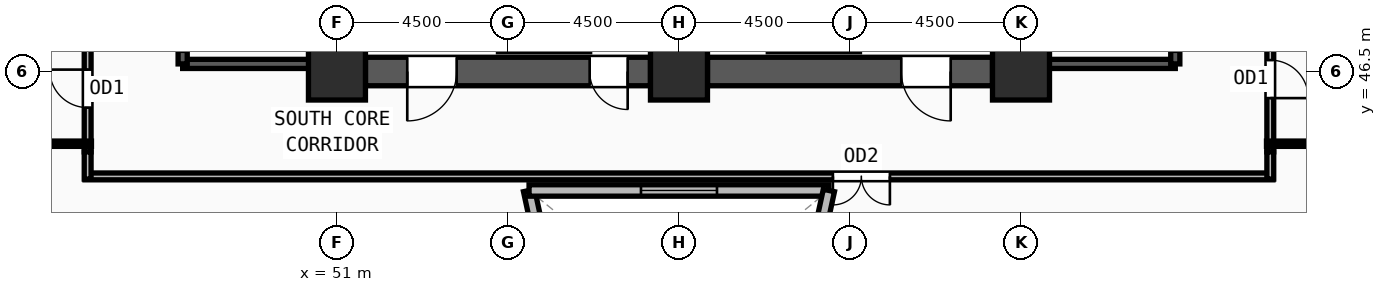
"""IFC4 building model, lengths in metres.
Left out: names, types, materials, properties, quantities, classifications, styles, units other than length and angle.
Written with IfcOpenShell. Run it as: python <this file> out.ifc"""

import sys

from ifc_helpers import new_model, si_unit, direction, frame, frame_2d, origin, origin_2d, place, context, subcontext, project, spatial, rectangle, extrude, source, transform, mapped, element, fill, save


model = new_model("IFC4")
c1 = context("Model", 3, precision=1e-05, world=origin(), true_north=direction((0.0, 1.0)))
c2 = subcontext(c1, "Body", "Model", "MODEL_VIEW")
j1 = project(units=[si_unit("LENGTHUNIT", "METRE"), si_unit("PLANEANGLEUNIT", "RADIAN")], contexts=[c1])
p1 = place(None, origin())
s1 = spatial("IfcSite", under=j1, at=p1, CompositionType="ELEMENT")
p2 = place(p1, origin())
s2 = spatial("IfcBuilding", under=s1, at=p2, CompositionType="ELEMENT")
p3 = place(p2, frame((0.0, 0.0, 166.5)))
s3 = spatial("IfcBuildingStorey", under=s2, at=p3, CompositionType="ELEMENT", Elevation=166.5)
m1 = source(origin(), c2, "Body", "SweptSolid", [
    extrude(rectangle(XDim=1.5, YDim=1.5, at=origin_2d()), origin(), (0.0, 0.0, 1.0), 3.75),
])
for number, where, z_axis, x_axis in (
    (1, (51.0, 46.5, 0.0), (0.0, 0.0, 1.0), (1.0, 0.0, 0.0)),
    (2, (60.0, 46.5, 0.0), (0.0, 0.0, 1.0), (1.0, 0.0, 0.0)),
    (3, (69.0, 46.5, 0.0), (0.0, 0.0, 1.0), (1.0, 0.0, 0.0)),
):
    element("IfcColumn", number, at=place(p3, frame(where, z_axis=z_axis, x_axis=x_axis)), inside=s3, PredefinedType="COLUMN", context=c2, shape_type="MappedRepresentation", body=[
        mapped(m1, transform((0.0, 0.0, 0.0), x_axis=(1.0, 0.0, 0.0), y_axis=(0.0, 1.0, 0.0), z_axis=(0.0, 0.0, 1.0), scale=1.0)),
    ])
p4 = place(p3, frame((66.073, 17.699, 0.0), z_axis=(0.0, 0.0, 1.0), x_axis=(0.551232339882, 0.834351788796, 0.0)))
e4 = element("IfcWall", 4, at=p4, inside=s3, PredefinedType="SOLIDWALL", context=c2, shape_type="SweptSolid", body=[
    extrude(rectangle(XDim=30.439, YDim=0.42, at=frame_2d((15.22, 0.0))), origin(), (0.0, 0.0, 1.0), 3.57),
])
m2 = source(origin(), c2, "Body", "SweptSolid", [
    extrude(rectangle(XDim=1.65, YDim=1.95, at=frame_2d((0.825, 0.975))), frame((0.0, 0.22, 0.0), z_axis=(0.0, -1.0, 0.0), x_axis=(1.0, 0.0, 0.0)), (0.0, 0.0, 1.0), 0.44),
])
p5 = place(p4, frame((6.785, 0.0, 0.55)))
e5 = element("IfcOpeningElement", 5, at=p5, cuts=e4, PredefinedType="OPENING", context=c2, shape_type="MappedRepresentation", body=[
    mapped(m2, transform((0.0, 0.0, 0.0), x_axis=(1.0, 0.0, 0.0), y_axis=(0.0, 1.0, 0.0), z_axis=(0.0, 0.0, 1.0), scale=1.0)),
])
p6 = place(p4, frame((14.395, 0.0, 0.55)))
e6 = element("IfcOpeningElement", 6, at=p6, cuts=e4, PredefinedType="OPENING", context=c2, shape_type="MappedRepresentation", body=[
    mapped(m2, transform((0.0, 0.0, 0.0), x_axis=(1.0, 0.0, 0.0), y_axis=(0.0, 1.0, 0.0), z_axis=(0.0, 0.0, 1.0), scale=1.0)),
])
p7 = place(p4, frame((22.004, 0.0, 0.55)))
e7 = element("IfcOpeningElement", 7, at=p7, cuts=e4, PredefinedType="OPENING", context=c2, shape_type="MappedRepresentation", body=[
    mapped(m2, transform((0.0, 0.0, 0.0), x_axis=(1.0, 0.0, 0.0), y_axis=(0.0, 1.0, 0.0), z_axis=(0.0, 0.0, 1.0), scale=1.0)),
])
p8 = place(p3, frame((68.25, 46.5, 0.0), z_axis=(0.0, 0.0, 1.0), x_axis=(-1.0, 0.0, 0.0)))
e8 = element("IfcWall", 8, at=p8, inside=s3, PredefinedType="SHEAR", context=c2, shape_type="SweptSolid", body=[
    extrude(rectangle(XDim=7.5, YDim=0.75, at=frame_2d((3.75, 0.0))), origin(), (0.0, 0.0, 1.0), 3.57),
])
m3 = source(origin(), c2, "Body", "SweptSolid", [
    extrude(rectangle(XDim=1.3, YDim=2.2, at=frame_2d((0.65, 1.1))), frame((0.0, 0.385, 0.0), z_axis=(0.0, -1.0, 0.0), x_axis=(1.0, 0.0, 0.0)), (0.0, 0.0, 1.0), 0.77),
])
p9 = place(p8, frame((1.1, 0.0, 0.0)))
e9 = element("IfcOpeningElement", 9, at=p9, cuts=e8, PredefinedType="OPENING", context=c2, shape_type="MappedRepresentation", body=[
    mapped(m3, transform((0.0, 0.0, 0.0), x_axis=(1.0, 0.0, 0.0), y_axis=(0.0, 1.0, 0.0), z_axis=(0.0, 0.0, 1.0), scale=1.0)),
])
p10 = place(p3, frame((59.25, 46.5, 0.0), z_axis=(0.0, 0.0, 1.0), x_axis=(-1.0, 0.0, 0.0)))
e10 = element("IfcWall", 10, at=p10, inside=s3, PredefinedType="SHEAR", context=c2, shape_type="SweptSolid", body=[
    extrude(rectangle(XDim=7.5, YDim=0.75, at=frame_2d((3.75, 0.0))), origin(), (0.0, 0.0, 1.0), 3.57),
])
p11 = place(p10, frame((5.1, 0.0, 0.0)))
e11 = element("IfcOpeningElement", 11, at=p11, cuts=e10, PredefinedType="OPENING", context=c2, shape_type="MappedRepresentation", body=[
    mapped(m3, transform((0.0, 0.0, 0.0), x_axis=(1.0, 0.0, 0.0), y_axis=(0.0, 1.0, 0.0), z_axis=(0.0, 0.0, 1.0), scale=1.0)),
])
m4 = source(origin(), c2, "Body", "SweptSolid", [
    extrude(rectangle(XDim=1.0, YDim=2.2, at=frame_2d((0.5, 1.1))), frame((0.0, 0.385, 0.0), z_axis=(0.0, -1.0, 0.0), x_axis=(1.0, 0.0, 0.0)), (0.0, 0.0, 1.0), 0.77),
])
p12 = place(p10, frame((0.6, 0.0, 0.0)))
e12 = element("IfcOpeningElement", 12, at=p12, cuts=e10, PredefinedType="OPENING", context=c2, shape_type="MappedRepresentation", body=[
    mapped(m4, transform((0.0, 0.0, 0.0), x_axis=(1.0, 0.0, 0.0), y_axis=(0.0, 1.0, 0.0), z_axis=(0.0, 0.0, 1.0), scale=1.0)),
])
p13 = place(p3, frame((46.94, 46.7, 0.0), z_axis=(0.0, 0.0, 1.0), x_axis=(1.0, 0.0, 0.0)))
e13 = element("IfcWall", 13, at=p13, inside=s3, PredefinedType="SOLIDWALL", context=c2, shape_type="SweptSolid", body=[
    extrude(rectangle(XDim=3.44, YDim=0.24, at=frame_2d((1.72, 0.0))), origin(), (0.0, 0.0, 1.0), 3.57),
])
p14 = place(p3, frame((50.38, 46.7, 0.0), z_axis=(0.0, 0.0, 1.0), x_axis=(0.0, 1.0, 0.0)))
e14 = element("IfcWall", 14, at=p14, inside=s3, PredefinedType="SOLIDWALL", context=c2, shape_type="SweptSolid", body=[
    extrude(rectangle(XDim=7.82, YDim=0.24, at=frame_2d((3.91, 0.0))), origin(), (0.0, 0.0, 1.0), 3.57),
])
p15 = place(p3, frame((46.94, 54.52, 0.0), z_axis=(0.0, 0.0, 1.0), x_axis=(0.0, -1.0, 0.0)))
e15 = element("IfcWall", 15, at=p15, inside=s3, PredefinedType="SOLIDWALL", context=c2, shape_type="SweptSolid", body=[
    extrude(rectangle(XDim=7.82, YDim=0.24, at=frame_2d((3.91, 0.0))), origin(), (0.0, 0.0, 1.0), 3.57),
])
m5 = source(origin(), c2, "Body", "SweptSolid", [
    extrude(rectangle(XDim=1.2, YDim=2.2, at=frame_2d((0.6, 1.1))), frame((0.0, 0.13, 0.0), z_axis=(0.0, -1.0, 0.0), x_axis=(1.0, 0.0, 0.0)), (0.0, 0.0, 1.0), 0.26),
])
p16 = place(p15, frame((6.3, 0.0, 0.0)))
e16 = element("IfcOpeningElement", 16, at=p16, cuts=e15, PredefinedType="OPENING", context=c2, shape_type="MappedRepresentation", body=[
    mapped(m5, transform((0.0, 0.0, 0.0), x_axis=(1.0, 0.0, 0.0), y_axis=(0.0, 1.0, 0.0), z_axis=(0.0, 0.0, 1.0), scale=1.0)),
])
p17 = place(p3, frame((69.62, 46.7, 0.0), z_axis=(0.0, 0.0, 1.0), x_axis=(1.0, 0.0, 0.0)))
e17 = element("IfcWall", 17, at=p17, inside=s3, PredefinedType="SOLIDWALL", context=c2, shape_type="SweptSolid", body=[
    extrude(rectangle(XDim=3.44, YDim=0.24, at=frame_2d((1.72, 0.0))), origin(), (0.0, 0.0, 1.0), 3.57),
])
p18 = place(p3, frame((73.06, 46.7, 0.0), z_axis=(0.0, 0.0, 1.0), x_axis=(0.0, 1.0, 0.0)))
e18 = element("IfcWall", 18, at=p18, inside=s3, PredefinedType="SOLIDWALL", context=c2, shape_type="SweptSolid", body=[
    extrude(rectangle(XDim=7.82, YDim=0.24, at=frame_2d((3.91, 0.0))), origin(), (0.0, 0.0, 1.0), 3.57),
])
p19 = place(p18, frame((0.32, 0.0, 0.0)))
e19 = element("IfcOpeningElement", 19, at=p19, cuts=e18, PredefinedType="OPENING", context=c2, shape_type="MappedRepresentation", body=[
    mapped(m5, transform((0.0, 0.0, 0.0), x_axis=(1.0, 0.0, 0.0), y_axis=(0.0, 1.0, 0.0), z_axis=(0.0, 0.0, 1.0), scale=1.0)),
])
p20 = place(p3, frame((69.62, 54.52, 0.0), z_axis=(0.0, 0.0, 1.0), x_axis=(0.0, -1.0, 0.0)))
e20 = element("IfcWall", 20, at=p20, inside=s3, PredefinedType="SOLIDWALL", context=c2, shape_type="SweptSolid", body=[
    extrude(rectangle(XDim=7.82, YDim=0.24, at=frame_2d((3.91, 0.0))), origin(), (0.0, 0.0, 1.0), 3.57),
])
p21 = place(p3, frame((57.436, 36.985, 0.0), z_axis=(0.0, 0.0, 1.0), x_axis=(-0.211414812525, 0.977396427784, 0.0)))
e21 = element("IfcWall", 21, at=p21, inside=s3, PredefinedType="SOLIDWALL", context=c2, shape_type="SweptSolid", body=[
    extrude(rectangle(XDim=6.533, YDim=0.3, at=frame_2d((3.266, 0.0))), origin(), (0.0, 0.0, 1.0), 3.57),
])
m6 = source(origin(), c2, "Body", "SweptSolid", [
    extrude(rectangle(XDim=2.0, YDim=1.9, at=frame_2d((1.0, 0.95))), frame((0.0, 0.16, 0.0), z_axis=(0.0, -1.0, 0.0), x_axis=(1.0, 0.0, 0.0)), (0.0, 0.0, 1.0), 0.32),
])
p22 = place(p21, frame((2.266, 0.0, 0.55)))
e22 = element("IfcOpeningElement", 22, at=p22, cuts=e21, PredefinedType="OPENING", context=c2, shape_type="MappedRepresentation", body=[
    mapped(m6, transform((0.0, 0.0, 0.0), x_axis=(1.0, 0.0, 0.0), y_axis=(0.0, 1.0, 0.0), z_axis=(0.0, 0.0, 1.0), scale=1.0)),
])
p23 = place(p3, frame((56.055, 43.37, 0.0), z_axis=(0.0, 0.0, 1.0), x_axis=(1.0, 0.0, 0.0)))
e23 = element("IfcWall", 23, at=p23, inside=s3, PredefinedType="SOLIDWALL", context=c2, shape_type="SweptSolid", body=[
    extrude(rectangle(XDim=7.89, YDim=0.3, at=frame_2d((3.945, 0.0))), origin(), (0.0, 0.0, 1.0), 3.57),
])
p24 = place(p23, frame((2.945, 0.0, 0.55)))
e24 = element("IfcOpeningElement", 24, at=p24, cuts=e23, PredefinedType="OPENING", context=c2, shape_type="MappedRepresentation", body=[
    mapped(m6, transform((0.0, 0.0, 0.0), x_axis=(1.0, 0.0, 0.0), y_axis=(0.0, 1.0, 0.0), z_axis=(0.0, 0.0, 1.0), scale=1.0)),
])
p25 = place(p3, frame((63.945, 43.37, 0.0), z_axis=(0.0, 0.0, 1.0), x_axis=(-0.211414812525, -0.977396427784, 0.0)))
e25 = element("IfcWall", 25, at=p25, inside=s3, PredefinedType="SOLIDWALL", context=c2, shape_type="SweptSolid", body=[
    extrude(rectangle(XDim=6.533, YDim=0.3, at=frame_2d((3.266, 0.0))), origin(), (0.0, 0.0, 1.0), 3.57),
])
p26 = place(p25, frame((2.266, 0.0, 0.55)))
e26 = element("IfcOpeningElement", 26, at=p26, cuts=e25, PredefinedType="OPENING", context=c2, shape_type="MappedRepresentation", body=[
    mapped(m6, transform((0.0, 0.0, 0.0), x_axis=(1.0, 0.0, 0.0), y_axis=(0.0, 1.0, 0.0), z_axis=(0.0, 0.0, 1.0), scale=1.0)),
])
p27 = place(p3, frame((44.44, 44.385, 0.0), z_axis=(0.0, 0.0, 1.0), x_axis=(0.0, 1.0, 0.0)))
e27 = element("IfcWall", 27, at=p27, inside=s3, PredefinedType="PARTITIONING", context=c2, shape_type="SweptSolid", body=[
    extrude(rectangle(XDim=3.33, YDim=0.18, at=frame_2d((1.665, 0.0))), origin(), (0.0, 0.0, 1.0), 3.57),
])
m7 = source(origin(), c2, "Body", "SweptSolid", [
    extrude(rectangle(XDim=1.0, YDim=2.2, at=frame_2d((0.5, 1.1))), frame((0.0, 0.1, 0.0), z_axis=(0.0, -1.0, 0.0), x_axis=(1.0, 0.0, 0.0)), (0.0, 0.0, 1.0), 0.2),
])
p28 = place(p27, frame((1.165, 0.0, 0.0)))
e28 = element("IfcOpeningElement", 28, at=p28, cuts=e27, PredefinedType="OPENING", context=c2, shape_type="MappedRepresentation", body=[
    mapped(m7, transform((0.0, 0.0, 0.0), x_axis=(1.0, 0.0, 0.0), y_axis=(0.0, 1.0, 0.0), z_axis=(0.0, 0.0, 1.0), scale=1.0)),
])
p29 = place(p3, frame((75.63, 43.74, 0.0), z_axis=(0.0, 0.0, 1.0), x_axis=(-1.0, 0.0, 0.0)))
e29 = element("IfcWall", 29, at=p29, inside=s3, PredefinedType="PARTITIONING", context=c2, shape_type="SweptSolid", body=[
    extrude(rectangle(XDim=31.26, YDim=0.18, at=frame_2d((15.63, 0.0))), origin(), (0.0, 0.0, 1.0), 3.57),
])
m8 = source(origin(), c2, "Body", "SweptSolid", [
    extrude(rectangle(XDim=1.5, YDim=2.2, at=frame_2d((0.75, 1.1))), frame((0.0, 0.1, 0.0), z_axis=(0.0, -1.0, 0.0), x_axis=(1.0, 0.0, 0.0)), (0.0, 0.0, 1.0), 0.2),
])
p30 = place(p29, frame((10.08, 0.0, 0.0)))
e30 = element("IfcOpeningElement", 30, at=p30, cuts=e29, PredefinedType="OPENING", context=c2, shape_type="MappedRepresentation", body=[
    mapped(m8, transform((0.0, 0.0, 0.0), x_axis=(1.0, 0.0, 0.0), y_axis=(0.0, 1.0, 0.0), z_axis=(0.0, 0.0, 1.0), scale=1.0)),
])
p31 = place(p3, frame((75.56, 48.215, 0.0), z_axis=(0.0, 0.0, 1.0), x_axis=(0.0, -1.0, 0.0)))
e31 = element("IfcWall", 31, at=p31, inside=s3, PredefinedType="PARTITIONING", context=c2, shape_type="SweptSolid", body=[
    extrude(rectangle(XDim=3.83, YDim=0.18, at=frame_2d((1.915, 0.0))), origin(), (0.0, 0.0, 1.0), 3.155),
])
p32 = place(p31, frame((1.415, 0.0, 0.0)))
e32 = element("IfcOpeningElement", 32, at=p32, cuts=e31, PredefinedType="OPENING", context=c2, shape_type="MappedRepresentation", body=[
    mapped(m7, transform((0.0, 0.0, 0.0), x_axis=(1.0, 0.0, 0.0), y_axis=(0.0, 1.0, 0.0), z_axis=(0.0, 0.0, 1.0), scale=1.0)),
])
for number, where, z_axis, x_axis in (
    (33, (44.44, 43.67, 0.0), (0.0, 0.0, 1.0), (0.0, 1.0, 0.0)),
    (34, (75.56, 44.385, 0.0), (0.0, 0.0, 1.0), (0.0, -1.0, 0.0)),
):
    element("IfcWall", number, at=place(p3, frame(where, z_axis=z_axis, x_axis=x_axis)), inside=s3, PredefinedType="PARTITIONING", context=c2, shape_type="SweptSolid", body=[
        extrude(rectangle(XDim=0.715, YDim=0.18, at=frame_2d((0.357, 0.0))), origin(), (0.0, 0.0, 1.0), 3.57),
    ])
p33 = place(p3, frame((44.54, 44.6, 0.0), z_axis=(0.0, 0.0, 1.0), x_axis=(-1.0, 0.0, 0.0)))
e35 = element("IfcWall", 35, at=p33, inside=s3, PredefinedType="PARTITIONING", context=c2, shape_type="SweptSolid", body=[
    extrude(rectangle(XDim=8.58, YDim=0.14, at=frame_2d((4.29, 0.0))), origin(), (0.0, 0.0, 1.0), 3.57),
])
p34 = place(p3, frame((75.46, 44.6, 0.0), z_axis=(0.0, 0.0, 1.0), x_axis=(1.0, 0.0, 0.0)))
e36 = element("IfcWall", 36, at=p34, inside=s3, PredefinedType="PARTITIONING", context=c2, shape_type="SweptSolid", body=[
    extrude(rectangle(XDim=8.922, YDim=0.14, at=frame_2d((4.461, 0.0))), origin(), (0.0, 0.0, 1.0), 3.57),
])
m9 = source(origin(), c2, "Body", "SweptSolid", [
    extrude(rectangle(XDim=1.3, YDim=2.2, at=frame_2d((0.65, 1.1))), frame((0.0, 0.025, 0.0), z_axis=(0.0, -1.0, 0.0), x_axis=(1.0, 0.0, 0.0)), (0.0, 0.0, 1.0), 0.05),
])
p35 = place(p11, origin())
e37 = element("IfcDoor", 37, at=p35, inside=s3, OperationType="SINGLE_SWING_RIGHT", PredefinedType="DOOR", context=c2, shape_type="MappedRepresentation", body=[
    mapped(m9, transform((0.0, 0.0, 0.0), x_axis=(1.0, 0.0, 0.0), y_axis=(0.0, 1.0, 0.0), z_axis=(0.0, 0.0, 1.0), scale=1.0)),
])
fill(e11, e37)
m10 = source(origin(), c2, "Body", "SweptSolid", [
    extrude(rectangle(XDim=1.0, YDim=2.2, at=frame_2d((0.5, 1.1))), frame((0.0, 0.025, 0.0), z_axis=(0.0, -1.0, 0.0), x_axis=(1.0, 0.0, 0.0)), (0.0, 0.0, 1.0), 0.05),
])
p36 = place(p12, origin())
e38 = element("IfcDoor", 38, at=p36, inside=s3, OperationType="SINGLE_SWING_LEFT", PredefinedType="DOOR", context=c2, shape_type="MappedRepresentation", body=[
    mapped(m10, transform((0.0, 0.0, 0.0), x_axis=(1.0, 0.0, 0.0), y_axis=(0.0, 1.0, 0.0), z_axis=(0.0, 0.0, 1.0), scale=1.0)),
])
fill(e12, e38)
p37 = place(p9, origin())
e39 = element("IfcDoor", 39, at=p37, inside=s3, OperationType="SINGLE_SWING_LEFT", PredefinedType="DOOR", context=c2, shape_type="MappedRepresentation", body=[
    mapped(m9, transform((0.0, 0.0, 0.0), x_axis=(1.0, 0.0, 0.0), y_axis=(0.0, 1.0, 0.0), z_axis=(0.0, 0.0, 1.0), scale=1.0)),
])
fill(e9, e39)
m11 = source(origin(), c2, "Body", "SweptSolid", [
    extrude(rectangle(XDim=2.0, YDim=1.9, at=frame_2d((1.0, 0.95))), frame((0.0, 0.03, 0.0), z_axis=(0.0, -1.0, 0.0), x_axis=(1.0, 0.0, 0.0)), (0.0, 0.0, 1.0), 0.06),
])
p38 = place(p24, origin())
e40 = element("IfcWindow", 40, at=p38, inside=s3, PartitioningType="DOUBLE_PANEL_VERTICAL", PredefinedType="WINDOW", context=c2, shape_type="MappedRepresentation", body=[
    mapped(m11, transform((0.0, 0.0, 0.0), x_axis=(1.0, 0.0, 0.0), y_axis=(0.0, 1.0, 0.0), z_axis=(0.0, 0.0, 1.0), scale=1.0)),
])
fill(e24, e40)
p39 = place(p28, origin())
e41 = element("IfcDoor", 41, at=p39, inside=s3, OperationType="SINGLE_SWING_RIGHT", PredefinedType="DOOR", context=c2, shape_type="MappedRepresentation", body=[
    mapped(m10, transform((0.0, 0.0, 0.0), x_axis=(1.0, 0.0, 0.0), y_axis=(0.0, 1.0, 0.0), z_axis=(0.0, 0.0, 1.0), scale=1.0)),
])
fill(e28, e41)
m12 = source(origin(), c2, "Body", "SweptSolid", [
    extrude(rectangle(XDim=1.5, YDim=2.2, at=frame_2d((0.75, 1.1))), frame((0.0, 0.025, 0.0), z_axis=(0.0, -1.0, 0.0), x_axis=(1.0, 0.0, 0.0)), (0.0, 0.0, 1.0), 0.05),
])
p40 = place(p30, origin())
e42 = element("IfcDoor", 42, at=p40, inside=s3, OperationType="DOUBLE_DOOR_SINGLE_SWING", PredefinedType="DOOR", context=c2, shape_type="MappedRepresentation", body=[
    mapped(m12, transform((0.0, 0.0, 0.0), x_axis=(1.0, 0.0, 0.0), y_axis=(0.0, 1.0, 0.0), z_axis=(0.0, 0.0, 1.0), scale=1.0)),
])
fill(e30, e42)
p41 = place(p32, origin())
e43 = element("IfcDoor", 43, at=p41, inside=s3, OperationType="SINGLE_SWING_RIGHT", PredefinedType="DOOR", context=c2, shape_type="MappedRepresentation", body=[
    mapped(m10, transform((0.0, 0.0, 0.0), x_axis=(1.0, 0.0, 0.0), y_axis=(0.0, 1.0, 0.0), z_axis=(0.0, 0.0, 1.0), scale=1.0)),
])
fill(e32, e43)
save(model, sys.argv[1])
